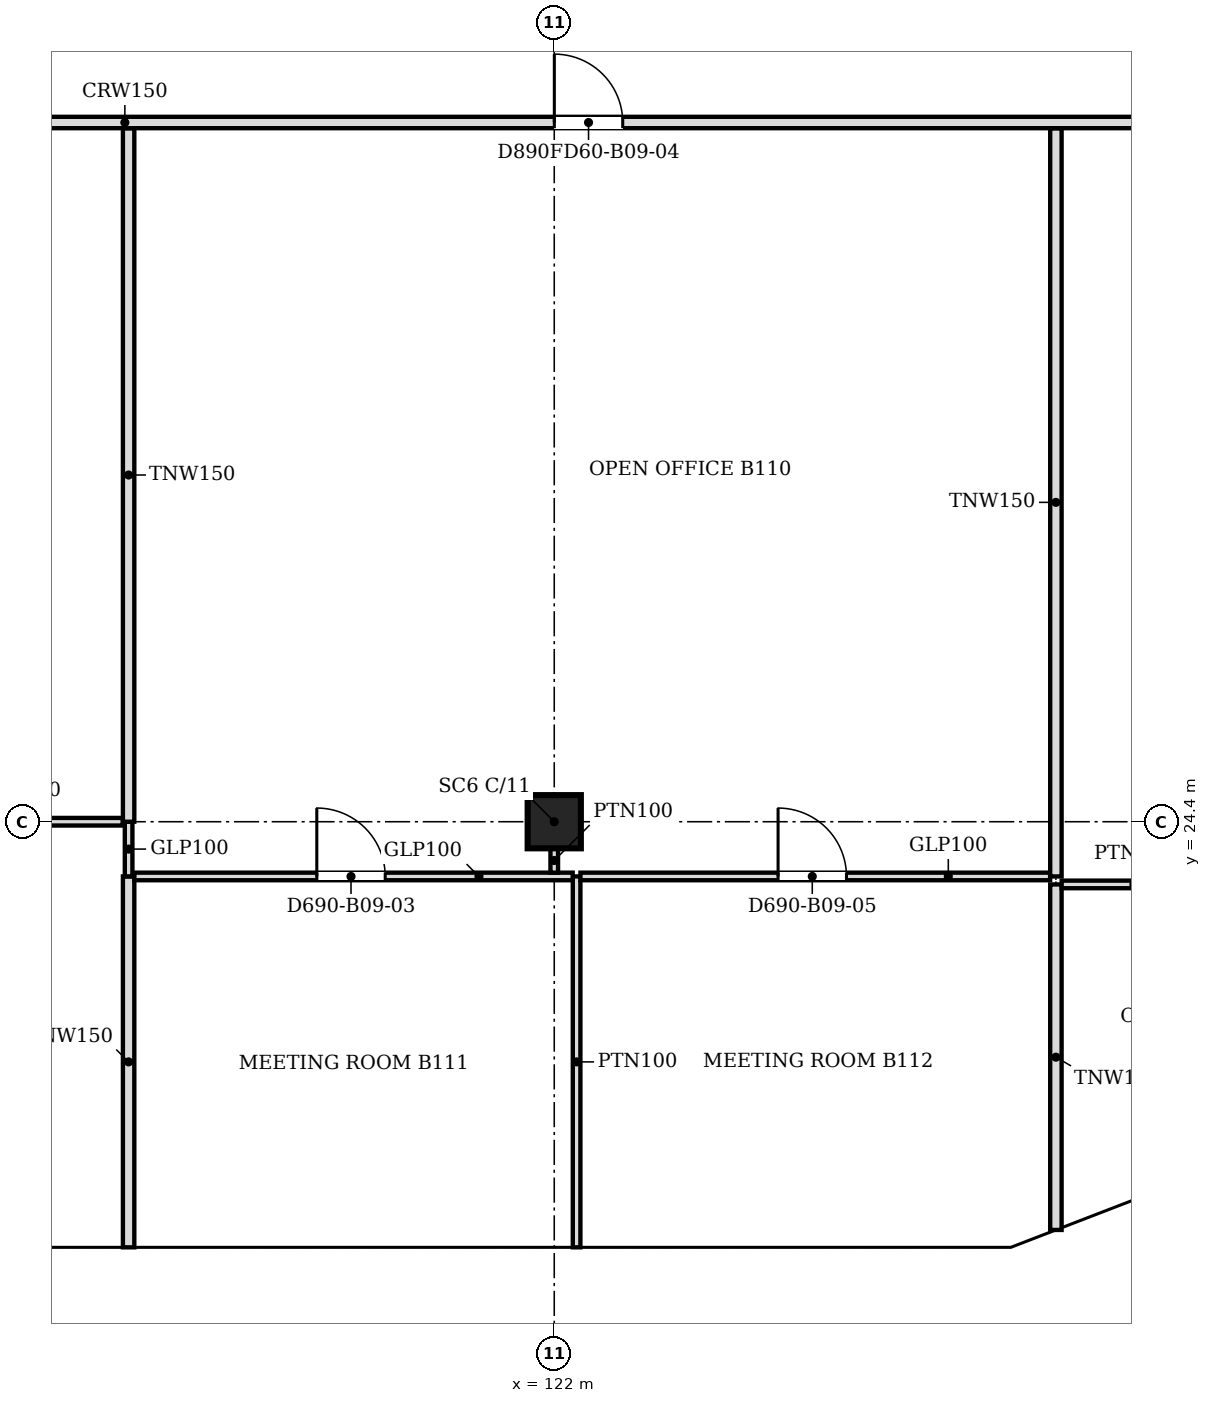
"""IFC4 building model, lengths in metres.
Left out: names, types, materials, properties, quantities, classifications, styles, units other than length and angle.
Written with IfcOpenShell. Run it as: python <this file> out.ifc"""

import sys

from ifc_helpers import new_model, si_unit, direction, frame, frame_2d, origin, origin_2d, place, context, subcontext, project, spatial, polyline, rectangle, outline, extrude, faceted_brep, source, transform, mapped, element, fill, save


model = new_model("IFC4")
c1 = context("Model", 3, precision=1e-05, world=origin(), true_north=direction((0.0, 1.0)))
c2 = subcontext(c1, "Body", "Model", "MODEL_VIEW")
j1 = project(units=[si_unit("LENGTHUNIT", "METRE"), si_unit("PLANEANGLEUNIT", "RADIAN")], contexts=[c1])
p1 = place(None, origin())
s1 = spatial("IfcSite", under=j1, at=p1, CompositionType="ELEMENT")
p2 = place(p1, origin())
s2 = spatial("IfcBuilding", under=s1, at=p2, CompositionType="ELEMENT")
p3 = place(p2, frame((0.0, 0.0, 91.4)))
s3 = spatial("IfcBuildingStorey", under=s2, at=p3, CompositionType="ELEMENT", Elevation=91.4)
p4 = place(p3, frame((122.0, 24.4, 0.0), z_axis=(0.0, 0.0, 1.0), x_axis=(1.0, 0.0, 0.0)))
e1 = element("IfcColumn", 1, at=p4, inside=s3, PredefinedType="COLUMN", context=c2, shape_type="SweptSolid", body=[
    extrude(rectangle(XDim=0.7, YDim=0.7, at=origin_2d()), origin(), (0.0, 0.0, 1.0), 3.6),
])
m1 = source(origin(), c2, "Body", "Brep", [
    faceted_brep([(3.05, -0.25, 0.0), (6.1, -0.25, 3.8), (6.1, -0.25, 3.8), (3.05, -0.25, 7.6), (0.0, -0.25, 3.8), (0.0, 0.25, 3.8), (3.05, 0.25, 7.6), (6.1, 0.25, 3.8), (6.1, 0.25, 3.8), (3.05, 0.25, 0.0)], [[[0, 1, 2, 3, 4]], [[5, 6, 7, 8, 9]], [[9, 8, 1, 0]], [[7, 6, 3, 2]], [[6, 5, 4, 3]], [[5, 9, 0, 4]], [[1, 8, 7, 2]]]),
])
p5 = place(p3, frame((112.85, 18.55, -3.8), z_axis=(0.0, 0.0, 1.0), x_axis=(1.0, 0.0, 0.0)))
e2 = element("IfcWall", 2, at=p5, inside=s3, PredefinedType="SOLIDWALL", context=c2, shape_type="MappedRepresentation", body=[
    mapped(m1, transform((0.0, 0.0, 0.0), scale=1.0)),
])
m2 = source(origin(), c2, "Body", "SweptSolid", [
    extrude(outline(polyline([(3.05, 0.399), (5.78, 3.8), (3.05, 7.2), (0.321, 3.8), (3.05, 0.399)])), frame((0.0, 0.26, 0.0), z_axis=(0.0, -1.0, 0.0), x_axis=(1.0, 0.0, 0.0)), (0.0, 0.0, 1.0), 0.52),
])
p6 = place(p5, origin())
e3 = element("IfcOpeningElement", 3, at=p6, cuts=e2, PredefinedType="OPENING", context=c2, shape_type="MappedRepresentation", body=[
    mapped(m2, transform((0.0, 0.0, 0.0), scale=1.0)),
])
m3 = source(origin(), c2, "Body", "SweptSolid", [
    extrude(outline(polyline([(3.05, 0.0), (6.1, 3.8), (3.05, 7.6), (0.0, 3.8), (3.05, 0.0)])), frame((0.0, 0.25, 0.0), z_axis=(0.0, -1.0, 0.0), x_axis=(1.0, 0.0, 0.0)), (0.0, 0.0, 1.0), 0.5),
])
p7 = place(p3, frame((118.95, 18.55, -3.8), z_axis=(0.0, 0.0, 1.0), x_axis=(1.0, 0.0, 0.0)))
e4 = element("IfcWall", 4, at=p7, inside=s3, PredefinedType="SOLIDWALL", context=c2, shape_type="MappedRepresentation", body=[
    mapped(m3, transform((0.0, 0.0, 0.0), scale=1.0)),
])
p8 = place(p7, origin())
e5 = element("IfcOpeningElement", 5, at=p8, cuts=e4, PredefinedType="OPENING", context=c2, shape_type="MappedRepresentation", body=[
    mapped(m2, transform((0.0, 0.0, 0.0), scale=1.0)),
])
m4 = source(origin(), c2, "Body", "Brep", [
    faceted_brep([(3.003, -0.25, 0.0), (3.05, -0.25, 0.06), (3.05, -0.25, 7.54), (3.003, -0.25, 7.6), (0.0, -0.25, 3.8), (0.0, 0.25, 3.8), (2.957, 0.25, 7.541), (2.957, 0.25, 0.059), (3.003, 0.0, 0.0), (3.003, 0.0, 7.6)], [[[0, 1, 2, 3, 4]], [[5, 6, 7]], [[1, 0, 8]], [[9, 3, 2]], [[6, 5, 4, 3, 9]], [[5, 7, 8, 0, 4]], [[1, 8, 7, 6, 9, 2]]]),
])
p9 = place(p3, frame((125.05, 18.55, -3.8), z_axis=(0.0, 0.0, 1.0), x_axis=(1.0, 0.0, 0.0)))
e6 = element("IfcWall", 6, at=p9, inside=s3, PredefinedType="SOLIDWALL", context=c2, shape_type="MappedRepresentation", body=[
    mapped(m4, transform((0.0, 0.0, 0.0), scale=1.0)),
])
m5 = source(origin(), c2, "Body", "SweptSolid", [
    extrude(outline(polyline([(2.803, 6.944), (0.319, 3.8), (2.803, 0.656), (2.803, 6.944)])), frame((0.0, 0.26, 0.0), z_axis=(0.0, -1.0, 0.0), x_axis=(1.0, 0.0, 0.0)), (0.0, 0.0, 1.0), 0.52),
])
p10 = place(p9, origin())
e7 = element("IfcOpeningElement", 7, at=p10, cuts=e6, PredefinedType="OPENING", context=c2, shape_type="MappedRepresentation", body=[
    mapped(m5, transform((0.0, 0.0, 0.0), scale=1.0)),
])
m6 = source(origin(), c2, "Body", "Brep", [
    faceted_brep([(0.047, -0.25, 0.0), (2.997, -0.25, 3.8), (0.047, -0.25, 7.6), (0.0, -0.25, 7.541), (0.0, -0.25, 0.059), (0.093, 0.25, 7.54), (2.944, 0.25, 3.868), (2.944, 0.25, 3.732), (0.093, 0.25, 0.06), (2.997, 0.0, 3.8), (0.047, 0.0, 0.0), (0.047, 0.0, 7.6)], [[[0, 1, 2, 3, 4]], [[5, 6, 7, 8]], [[8, 7, 9, 1, 0, 10]], [[6, 5, 11, 2, 1, 9]], [[3, 2, 11]], [[10, 0, 4]], [[8, 10, 4, 3, 11, 5]], [[9, 7, 6]]]),
])
p11 = place(p3, frame((128.01, 18.533, -3.8), z_axis=(0.0, 0.0, 1.0), x_axis=(0.932990326376, 0.359901446078, 0.0)))
e8 = element("IfcWall", 8, at=p11, inside=s3, PredefinedType="SOLIDWALL", context=c2, shape_type="MappedRepresentation", body=[
    mapped(m6, transform((0.0, 0.0, 0.0), scale=1.0)),
])
m7 = source(origin(), c2, "Body", "SweptSolid", [
    extrude(outline(polyline([(0.247, 0.665), (2.681, 3.8), (0.247, 6.935), (0.247, 0.665)])), frame((0.0, 0.26, 0.0), z_axis=(0.0, -1.0, 0.0), x_axis=(1.0, 0.0, 0.0)), (0.0, 0.0, 1.0), 0.52),
])
p12 = place(p11, origin())
e9 = element("IfcOpeningElement", 9, at=p12, cuts=e8, PredefinedType="OPENING", context=c2, shape_type="MappedRepresentation", body=[
    mapped(m7, transform((0.0, 0.0, 0.0), scale=1.0)),
])
m8 = source(origin(), c2, "Body", "Brep", [
    faceted_brep([(3.05, -0.25, 0.0), (6.1, -0.25, 3.8), (6.1, -0.25, 3.8), (0.0, -0.25, 3.8), (0.0, 0.25, 3.8), (6.1, 0.25, 3.8), (6.1, 0.25, 3.8), (3.05, 0.25, 0.0)], [[[0, 1, 2, 3]], [[4, 5, 6, 7]], [[7, 6, 1, 0]], [[5, 4, 3, 2]], [[4, 7, 0, 3]], [[1, 6, 5, 2]]]),
])
p13 = place(p3, frame((109.8, 18.55, 0.0), z_axis=(0.0, 0.0, 1.0), x_axis=(1.0, 0.0, 0.0)))
e10 = element("IfcWall", 10, at=p13, inside=s3, PredefinedType="SOLIDWALL", context=c2, shape_type="MappedRepresentation", body=[
    mapped(m8, transform((0.0, 0.0, 0.0), scale=1.0)),
])
m9 = source(origin(), c2, "Body", "SweptSolid", [
    extrude(outline(polyline([(3.05, 0.399), (5.579, 3.55), (0.521, 3.55), (3.05, 0.399)])), frame((0.0, 0.26, 0.0), z_axis=(0.0, -1.0, 0.0), x_axis=(1.0, 0.0, 0.0)), (0.0, 0.0, 1.0), 0.52),
])
p14 = place(p13, origin())
e11 = element("IfcOpeningElement", 11, at=p14, cuts=e10, PredefinedType="OPENING", context=c2, shape_type="MappedRepresentation", body=[
    mapped(m9, transform((0.0, 0.0, 0.0), scale=1.0)),
])
m10 = source(origin(), c2, "Body", "SweptSolid", [
    extrude(outline(polyline([(3.05, 0.0), (6.1, 3.8), (0.0, 3.8), (3.05, 0.0)])), frame((0.0, 0.25, 0.0), z_axis=(0.0, -1.0, 0.0), x_axis=(1.0, 0.0, 0.0)), (0.0, 0.0, 1.0), 0.5),
])
p15 = place(p3, frame((115.9, 18.55, 0.0), z_axis=(0.0, 0.0, 1.0), x_axis=(1.0, 0.0, 0.0)))
e12 = element("IfcWall", 12, at=p15, inside=s3, PredefinedType="SOLIDWALL", context=c2, shape_type="MappedRepresentation", body=[
    mapped(m10, transform((0.0, 0.0, 0.0), scale=1.0)),
])
p16 = place(p15, origin())
e13 = element("IfcOpeningElement", 13, at=p16, cuts=e12, PredefinedType="OPENING", context=c2, shape_type="MappedRepresentation", body=[
    mapped(m9, transform((0.0, 0.0, 0.0), scale=1.0)),
])
m11 = source(origin(), c2, "Body", "Brep", [
    faceted_brep([(3.05, -0.25, 0.0), (6.053, -0.25, 3.8), (0.0, -0.25, 3.8), (0.0, 0.25, 3.8), (6.007, 0.25, 3.8), (6.007, 0.25, 3.741), (3.05, 0.25, 0.0), (6.053, 0.0, 3.8)], [[[0, 1, 2]], [[3, 4, 5, 6]], [[6, 5, 7, 1, 0]], [[4, 3, 2, 1, 7]], [[3, 6, 0, 2]], [[5, 4, 7]]]),
])
p17 = place(p3, frame((122.0, 18.55, 0.0), z_axis=(0.0, 0.0, 1.0), x_axis=(1.0, 0.0, 0.0)))
e14 = element("IfcWall", 14, at=p17, inside=s3, PredefinedType="SOLIDWALL", context=c2, shape_type="MappedRepresentation", body=[
    mapped(m11, transform((0.0, 0.0, 0.0), scale=1.0)),
])
m12 = source(origin(), c2, "Body", "SweptSolid", [
    extrude(outline(polyline([(3.049, 0.401), (5.537, 3.55), (0.521, 3.55), (3.049, 0.401)])), frame((0.0, 0.26, 0.0), z_axis=(0.0, -1.0, 0.0), x_axis=(1.0, 0.0, 0.0)), (0.0, 0.0, 1.0), 0.52),
])
p18 = place(p17, origin())
e15 = element("IfcOpeningElement", 15, at=p18, cuts=e14, PredefinedType="OPENING", context=c2, shape_type="MappedRepresentation", body=[
    mapped(m12, transform((0.0, 0.0, 0.0), scale=1.0)),
])
m13 = source(origin(), c2, "Body", "Brep", [
    faceted_brep([(2.95, -0.25, 0.0), (3.003, -0.25, 0.068), (3.003, -0.25, 3.8), (0.0, -0.25, 3.8), (0.047, 0.25, 3.8), (2.898, 0.25, 3.8), (2.898, 0.25, 0.068), (0.047, 0.25, 3.74), (2.95, 0.0, 0.0), (0.0, 0.0, 3.8)], [[[0, 1, 2, 3]], [[4, 5, 6, 7]], [[1, 0, 8]], [[5, 4, 9, 3, 2]], [[7, 6, 8, 0, 3, 9]], [[7, 9, 4]], [[1, 8, 6, 5, 2]]]),
])
p19 = place(p3, frame((128.053, 18.55, 0.0), z_axis=(0.0, 0.0, 1.0), x_axis=(0.933007896601, 0.359855894603, 0.0)))
e16 = element("IfcWall", 16, at=p19, inside=s3, PredefinedType="SOLIDWALL", context=c2, shape_type="MappedRepresentation", body=[
    mapped(m13, transform((0.0, 0.0, 0.0), scale=1.0)),
])
m14 = source(origin(), c2, "Body", "SweptSolid", [
    extrude(outline(polyline([(2.75, 3.55), (0.511, 3.55), (2.75, 0.665), (2.75, 3.55)])), frame((0.0, 0.26, 0.0), z_axis=(0.0, -1.0, 0.0), x_axis=(1.0, 0.0, 0.0)), (0.0, 0.0, 1.0), 0.52),
])
p20 = place(p19, origin())
e17 = element("IfcOpeningElement", 17, at=p20, cuts=e16, PredefinedType="OPENING", context=c2, shape_type="MappedRepresentation", body=[
    mapped(m14, transform((0.0, 0.0, 0.0), scale=1.0)),
])
p21 = place(p3, frame((116.4, 18.8, 0.0), z_axis=(0.0, 0.0, 1.0), x_axis=(0.0, 1.0, 0.0)))
e18 = element("IfcWall", 18, at=p21, inside=s3, PredefinedType="PARTITIONING", context=c2, shape_type="SweptSolid", body=[
    extrude(rectangle(XDim=4.88, YDim=0.15, at=frame_2d((2.44, 0.0))), origin(), (0.0, 0.0, 1.0), 2.895),
])
p22 = place(p3, frame((122.294, 18.8, 0.0), z_axis=(0.0, 0.0, 1.0), x_axis=(0.0, 1.0, 0.0)))
e19 = element("IfcWall", 19, at=p22, inside=s3, PredefinedType="PARTITIONING", context=c2, shape_type="SweptSolid", body=[
    extrude(rectangle(XDim=4.88, YDim=0.1, at=frame_2d((2.44, 0.0))), origin(), (0.0, 0.0, 1.0), 2.895),
])
p23 = place(p3, frame((128.6, 19.029, 0.0), z_axis=(0.0, 0.0, 1.0), x_axis=(0.0, 1.0, 0.0)))
e20 = element("IfcWall", 20, at=p23, inside=s3, PredefinedType="PARTITIONING", context=c2, shape_type="SweptSolid", body=[
    extrude(rectangle(XDim=4.546, YDim=0.15, at=frame_2d((2.273, 0.0))), origin(), (0.0, 0.0, 1.0), 2.895),
])
p24 = place(p3, frame((133.346, 23.575, 0.0), z_axis=(0.0, 0.0, 1.0), x_axis=(-1.0, 0.0, 0.0)))
e21 = element("IfcWall", 21, at=p24, inside=s3, PredefinedType="PARTITIONING", context=c2, shape_type="SweptSolid", body=[
    extrude(rectangle(XDim=4.67, YDim=0.1, at=frame_2d((2.335, 0.0))), origin(), (0.0, 0.0, 1.0), 2.895),
])
m15 = source(origin(), c2, "Body", "SweptSolid", [
    extrude(rectangle(XDim=0.9, YDim=2.1, at=frame_2d((0.45, 1.05))), frame((0.0, 0.06, 0.0), z_axis=(0.0, -1.0, 0.0), x_axis=(1.0, 0.0, 0.0)), (0.0, 0.0, 1.0), 0.12),
])
p25 = place(p24, frame((1.87, 0.0, 0.0)))
e22 = element("IfcOpeningElement", 22, at=p25, cuts=e21, PredefinedType="OPENING", context=c2, shape_type="MappedRepresentation", body=[
    mapped(m15, transform((0.0, 0.0, 0.0), scale=1.0)),
])
p26 = place(p3, frame((116.4, 23.681, 0.0), z_axis=(0.0, 0.0, 1.0), x_axis=(0.0, 1.0, 0.0)))
e23 = element("IfcWall", 23, at=p26, inside=s3, PredefinedType="PARTITIONING", context=c2, shape_type="SweptSolid", body=[
    extrude(rectangle(XDim=0.718, YDim=0.1, at=frame_2d((0.359, 0.0))), origin(), (0.0, 0.0, 1.0), 2.895),
])
p27 = place(p3, frame((122.243, 23.68, 0.0), z_axis=(0.0, 0.0, 1.0), x_axis=(-1.0, 0.0, 0.0)))
e24 = element("IfcWall", 24, at=p27, inside=s3, PredefinedType="PARTITIONING", context=c2, shape_type="SweptSolid", body=[
    extrude(rectangle(XDim=5.767, YDim=0.1, at=frame_2d((2.883, 0.0))), origin(), (0.0, 0.0, 1.0), 2.895),
])
p28 = place(p27, frame((2.467, 0.0, 0.0)))
e25 = element("IfcOpeningElement", 25, at=p28, cuts=e24, PredefinedType="OPENING", context=c2, shape_type="MappedRepresentation", body=[
    mapped(m15, transform((0.0, 0.0, 0.0), scale=1.0)),
])
p29 = place(p3, frame((128.524, 23.68, 0.0), z_axis=(0.0, 0.0, 1.0), x_axis=(-1.0, 0.0, 0.0)))
e26 = element("IfcWall", 26, at=p29, inside=s3, PredefinedType="PARTITIONING", context=c2, shape_type="SweptSolid", body=[
    extrude(rectangle(XDim=6.179, YDim=0.1, at=frame_2d((3.09, 0.0))), origin(), (0.0, 0.0, 1.0), 2.895),
])
p30 = place(p29, frame((2.679, 0.0, 0.0)))
e27 = element("IfcOpeningElement", 27, at=p30, cuts=e26, PredefinedType="OPENING", context=c2, shape_type="MappedRepresentation", body=[
    mapped(m15, transform((0.0, 0.0, 0.0), scale=1.0)),
])
p31 = place(p3, frame((128.6, 23.68, 0.0), z_axis=(0.0, 0.0, 1.0), x_axis=(0.0, 1.0, 0.0)))
e28 = element("IfcWall", 28, at=p31, inside=s3, PredefinedType="PARTITIONING", context=c2, shape_type="SweptSolid", body=[
    extrude(rectangle(XDim=9.844, YDim=0.15, at=frame_2d((4.922, 0.0))), origin(), (0.0, 0.0, 1.0), 2.895),
])
p32 = place(p3, frame((122.0, 24.05, 0.0), z_axis=(0.0, 0.0, 1.0), x_axis=(0.0, -1.0, 0.0)))
e29 = element("IfcWall", 29, at=p32, inside=s3, PredefinedType="PARTITIONING", context=c2, shape_type="SweptSolid", body=[
    extrude(rectangle(XDim=0.32, YDim=0.1, at=frame_2d((0.16, 0.0))), origin(), (0.0, 0.0, 1.0), 2.895),
])
p33 = place(p3, frame((116.324, 24.4, 0.0), z_axis=(0.0, 0.0, 1.0), x_axis=(-1.0, 0.0, 0.0)))
e30 = element("IfcWall", 30, at=p33, inside=s3, PredefinedType="PARTITIONING", context=c2, shape_type="SweptSolid", body=[
    extrude(rectangle(XDim=6.173, YDim=0.1, at=frame_2d((3.086, 0.0))), origin(), (0.0, 0.0, 1.0), 2.895),
])
p34 = place(p33, frame((2.673, 0.0, 0.0)))
e31 = element("IfcOpeningElement", 31, at=p34, cuts=e30, PredefinedType="OPENING", context=c2, shape_type="MappedRepresentation", body=[
    mapped(m15, transform((0.0, 0.0, 0.0), scale=1.0)),
])
p35 = place(p3, frame((116.4, 24.4, 0.0), z_axis=(0.0, 0.0, 1.0), x_axis=(0.0, 1.0, 0.0)))
e32 = element("IfcWall", 32, at=p35, inside=s3, PredefinedType="PARTITIONING", context=c2, shape_type="SweptSolid", body=[
    extrude(rectangle(XDim=9.124, YDim=0.15, at=frame_2d((4.562, 0.0))), origin(), (0.0, 0.0, 1.0), 2.895),
])
p36 = place(p3, frame((133.7, 33.6, 0.0), z_axis=(0.0, 0.0, 1.0), x_axis=(-1.0, 0.0, 0.0)))
e33 = element("IfcWall", 33, at=p36, inside=s3, PredefinedType="PARTITIONING", context=c2, shape_type="SweptSolid", body=[
    extrude(rectangle(XDim=47.8, YDim=0.15, at=frame_2d((23.9, 0.0))), origin(), (0.0, 0.0, 1.0), 2.895),
])
m16 = source(origin(), c2, "Body", "SweptSolid", [
    extrude(rectangle(XDim=0.9, YDim=2.1, at=frame_2d((0.45, 1.05))), frame((0.0, 0.085, 0.0), z_axis=(0.0, -1.0, 0.0), x_axis=(1.0, 0.0, 0.0)), (0.0, 0.0, 1.0), 0.17),
])
p37 = place(p36, frame((2.099, 0.0, 0.0)))
e34 = element("IfcOpeningElement", 34, at=p37, cuts=e33, PredefinedType="OPENING", context=c2, shape_type="MappedRepresentation", body=[
    mapped(m16, transform((0.0, 0.0, 0.0), scale=1.0)),
])
m17 = source(origin(), c2, "Body", "SweptSolid", [
    extrude(rectangle(XDim=1.0, YDim=2.1, at=frame_2d((0.5, 1.05))), frame((0.0, 0.085, 0.0), z_axis=(0.0, -1.0, 0.0), x_axis=(1.0, 0.0, 0.0)), (0.0, 0.0, 1.0), 0.17),
])
p38 = place(p36, frame((38.399, 0.0, 0.0)))
e35 = element("IfcOpeningElement", 35, at=p38, cuts=e33, PredefinedType="OPENING", context=c2, shape_type="MappedRepresentation", body=[
    mapped(m17, transform((0.0, 0.0, 0.0), scale=1.0)),
])
p39 = place(p36, frame((44.3, 0.0, 0.0)))
e36 = element("IfcOpeningElement", 36, at=p39, cuts=e33, PredefinedType="OPENING", context=c2, shape_type="MappedRepresentation", body=[
    mapped(m16, transform((0.0, 0.0, 0.0), scale=1.0)),
])
p40 = place(p36, frame((32.4, 0.0, 0.0)))
e37 = element("IfcOpeningElement", 37, at=p40, cuts=e33, PredefinedType="OPENING", context=c2, shape_type="MappedRepresentation", body=[
    mapped(m16, transform((0.0, 0.0, 0.0), scale=1.0)),
])
p41 = place(p36, frame((10.799, 0.0, 0.0)))
e38 = element("IfcOpeningElement", 38, at=p41, cuts=e33, PredefinedType="OPENING", context=c2, shape_type="MappedRepresentation", body=[
    mapped(m16, transform((0.0, 0.0, 0.0), scale=1.0)),
])
p42 = place(p36, frame((23.0, 0.0, 0.0)))
e39 = element("IfcOpeningElement", 39, at=p42, cuts=e33, PredefinedType="OPENING", context=c2, shape_type="MappedRepresentation", body=[
    mapped(m16, transform((0.0, 0.0, 0.0), scale=1.0)),
])
m18 = source(origin(), c2, "Body", "SweptSolid", [
    extrude(rectangle(XDim=0.9, YDim=2.1, at=frame_2d((0.45, 1.05))), frame((0.0, 0.025, 0.0), z_axis=(0.0, -1.0, 0.0), x_axis=(1.0, 0.0, 0.0)), (0.0, 0.0, 1.0), 0.05),
])
p43 = place(p28, origin())
e40 = element("IfcDoor", 40, at=p43, inside=s3, OperationType="SINGLE_SWING_RIGHT", PredefinedType="DOOR", context=c2, shape_type="MappedRepresentation", body=[
    mapped(m18, transform((0.0, 0.0, 0.0), scale=1.0)),
])
fill(e25, e40)
p44 = place(p30, origin())
e41 = element("IfcDoor", 41, at=p44, inside=s3, OperationType="SINGLE_SWING_RIGHT", PredefinedType="DOOR", context=c2, shape_type="MappedRepresentation", body=[
    mapped(m18, transform((0.0, 0.0, 0.0), scale=1.0)),
])
fill(e27, e41)
p45 = place(p41, origin())
e42 = element("IfcDoor", 42, at=p45, inside=s3, OperationType="SINGLE_SWING_RIGHT", PredefinedType="DOOR", context=c2, shape_type="MappedRepresentation", body=[
    mapped(m18, transform((0.0, 0.0, 0.0), scale=1.0)),
])
fill(e38, e42)
save(model, sys.argv[1])
